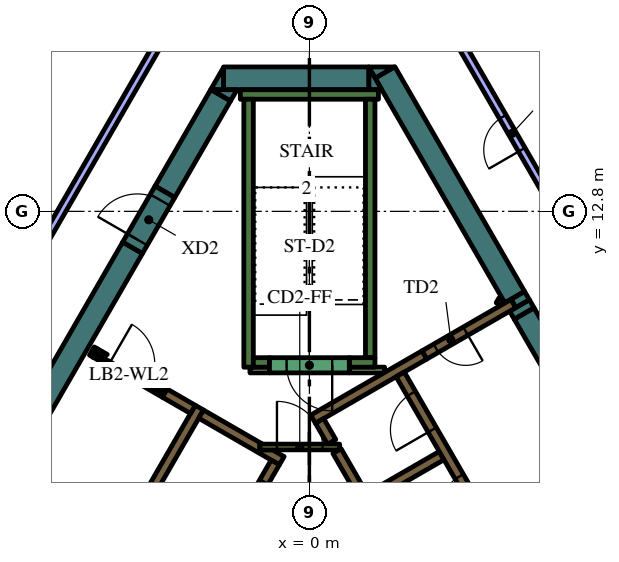
"""IFC4 building model, lengths in metres.
Left out: names, types, materials, properties, quantities, classifications, styles, units other than length and angle.
Written with IfcOpenShell. Run it as: python <this file> out.ifc"""

import sys

from ifc_helpers import new_model, si_unit, direction, frame, frame_2d, origin, place, context, subcontext, project, spatial, polyline, rectangle, outline, extrude, element, fill, save


model = new_model("IFC4")
c1 = context("Model", 3, precision=1e-05, world=origin(), true_north=direction((0.0, 1.0)))
c2 = subcontext(c1, "Body", "Model", "MODEL_VIEW")
j1 = project(units=[si_unit("LENGTHUNIT", "METRE"), si_unit("PLANEANGLEUNIT", "RADIAN")], contexts=[c1])
p1 = place(None, origin())
s1 = spatial("IfcSite", under=j1, at=p1, CompositionType="ELEMENT")
p2 = place(p1, origin())
s2 = spatial("IfcBuilding", under=s1, at=p2, CompositionType="ELEMENT")
p3 = place(p2, frame((0.0, 0.0, 296.4)))
s3 = spatial("IfcBuildingStorey", under=s2, at=p3, CompositionType="ELEMENT", Elevation=296.4)
p4 = place(p3, frame((5.529, 10.324, 0.0), z_axis=(0.0, 0.0, 1.0), x_axis=(0.499122205112, -0.866531606097, 0.0)))
e1 = element("IfcWall", 1, at=p4, inside=s3, PredefinedType="SOLIDWALL", context=c2, shape_type="SweptSolid", body=[
    extrude(rectangle(XDim=0.247, YDim=0.6, at=frame_2d((0.123, 0.0))), origin(), (0.0, 0.0, 1.0), 4.2),
])
p5 = place(p3, frame((1.989, 16.456, 0.0), z_axis=(0.0, 0.0, 1.0), x_axis=(0.499973159588, -0.866040899549, 0.0)))
e2 = element("IfcWall", 2, at=p5, inside=s3, PredefinedType="SOLIDWALL", context=c2, shape_type="SweptSolid", body=[
    extrude(rectangle(XDim=6.828, YDim=0.6, at=frame_2d((3.414, 0.0))), origin(), (0.0, 0.0, 1.0), 4.2),
])
p6 = place(p3, origin())
e3 = element("IfcWall", 3, at=p6, inside=s3, PredefinedType="SOLIDWALL", context=c2, shape_type="SweptSolid", body=[
    extrude(outline(polyline([(5.664, 10.691), (5.788, 10.476), (5.432, 10.271), (5.308, 10.486), (5.664, 10.691)])), origin(), (0.0, 0.0, 1.0), 4.2),
])
e4 = element("IfcWall", 4, at=p6, inside=s3, PredefinedType="SOLIDWALL", context=c2, shape_type="SweptSolid", body=[
    extrude(outline(polyline([(1.559, 16.6), (2.235, 16.6), (1.728, 16.307), (1.559, 16.6)])), origin(), (0.0, 0.0, 1.0), 4.2),
])
p7 = place(p3, frame((8.192, 5.711, 0.0), z_axis=(0.0, 0.0, 1.0), x_axis=(-0.500006836656, 0.866021456604, 0.0)))
e5 = element("IfcWall", 5, at=p7, inside=s3, PredefinedType="SOLIDWALL", context=c2, shape_type="SweptSolid", body=[
    extrude(rectangle(XDim=5.078, YDim=0.6, at=frame_2d((2.539, 0.0))), origin(), (0.0, 0.0, 1.0), 4.2),
])
p8 = place(p3, frame((-2.258, 16.3, 0.0), z_axis=(0.0, 0.0, 1.0), x_axis=(1.0, 0.0, 0.0)))
e6 = element("IfcWall", 6, at=p8, inside=s3, PredefinedType="SOLIDWALL", context=c2, shape_type="SweptSolid", body=[
    extrude(rectangle(XDim=3.823, YDim=0.6, at=frame_2d((1.912, 0.0))), origin(), (0.0, 0.0, 1.0), 4.2),
])
e7 = element("IfcWall", 7, at=p6, inside=s3, PredefinedType="SOLIDWALL", context=c2, shape_type="SweptSolid", body=[
    extrude(outline(polyline([(1.905, 16.0), (1.567, 16.0), (1.567, 16.585), (1.905, 16.0)])), origin(), (0.0, 0.0, 1.0), 4.2),
])
e8 = element("IfcWall", 8, at=p6, inside=s3, PredefinedType="SOLIDWALL", context=c2, shape_type="SweptSolid", body=[
    extrude(outline(polyline([(-2.598, 16.0), (-2.26, 16.585), (-2.26, 16.0), (-2.598, 16.0)])), origin(), (0.0, 0.0, 1.0), 4.2),
])
p9 = place(p3, frame((-2.335, 15.855, 0.0), z_axis=(0.0, 0.0, 1.0), x_axis=(-0.499960127962, -0.866048422692, 0.0)))
e9 = element("IfcWall", 9, at=p9, inside=s3, PredefinedType="SOLIDWALL", context=c2, shape_type="SweptSolid", body=[
    extrude(rectangle(XDim=2.934, YDim=0.6, at=frame_2d((1.467, 0.0))), origin(), (0.0, 0.0, 1.0), 4.2),
])
e10 = element("IfcWall", 10, at=p6, inside=s3, PredefinedType="SOLIDWALL", context=c2, shape_type="SweptSolid", body=[
    extrude(outline(polyline([(-1.905, 16.0), (-2.074, 15.707), (-2.581, 16.0), (-1.905, 16.0)])), origin(), (0.0, 0.0, 1.0), 4.2),
])
p10 = place(p3, frame((-12.582, -1.892, 0.0), z_axis=(0.0, 0.0, 1.0), x_axis=(0.500003640647, 0.866023301845, 0.0)))
e11 = element("IfcWall", 11, at=p10, inside=s3, PredefinedType="SOLIDWALL", context=c2, shape_type="SweptSolid", body=[
    extrude(rectangle(XDim=15.858, YDim=0.6, at=frame_2d((7.929, 0.0))), origin(), (0.0, 0.0, 1.0), 4.2),
])
p11 = place(p3, frame((-1.817, 15.875, 0.0), z_axis=(0.0, 0.0, 1.0), x_axis=(1.0, 0.0, 0.0)))
e12 = element("IfcWall", 12, at=p11, inside=s3, PredefinedType="SOLIDWALL", context=c2, shape_type="SweptSolid", body=[
    extrude(rectangle(XDim=3.634, YDim=0.25, at=frame_2d((1.817, 0.0))), origin(), (0.0, 0.0, 1.0), 4.2),
])
p12 = place(p3, frame((1.6, 8.95, 0.0), z_axis=(0.0, 0.0, 1.0), x_axis=(0.0, 1.0, 0.0)))
e13 = element("IfcWall", 13, at=p12, inside=s3, PredefinedType="SOLIDWALL", context=c2, shape_type="SweptSolid", body=[
    extrude(rectangle(XDim=6.8, YDim=0.25, at=frame_2d((3.4, 0.0))), origin(), (0.0, 0.0, 1.0), 4.2),
])
p13 = place(p3, frame((1.05, 8.825, 0.0), z_axis=(0.0, 0.0, 1.0), x_axis=(1.0, 0.0, 0.0)))
e14 = element("IfcWall", 14, at=p13, inside=s3, PredefinedType="SOLIDWALL", context=c2, shape_type="SweptSolid", body=[
    extrude(rectangle(XDim=0.675, YDim=0.25, at=frame_2d((0.337, 0.0))), origin(), (0.0, 0.0, 1.0), 4.2),
])
p14 = place(p3, frame((-1.6, 8.7, 0.0), z_axis=(0.0, 0.0, 1.0), x_axis=(0.0, 1.0, 0.0)))
e15 = element("IfcWall", 15, at=p14, inside=s3, PredefinedType="SOLIDWALL", context=c2, shape_type="SweptSolid", body=[
    extrude(rectangle(XDim=7.05, YDim=0.25, at=frame_2d((3.525, 0.0))), origin(), (0.0, 0.0, 1.0), 4.2),
])
p15 = place(p3, frame((-1.475, 8.825, 0.0), z_axis=(0.0, 0.0, 1.0), x_axis=(1.0, 0.0, 0.0)))
e16 = element("IfcWall", 16, at=p15, inside=s3, PredefinedType="SOLIDWALL", context=c2, shape_type="SweptSolid", body=[
    extrude(rectangle(XDim=0.425, YDim=0.25, at=frame_2d((0.212, 0.0))), origin(), (0.0, 0.0, 1.0), 4.2),
])
p16 = place(p3, frame((3.028, 9.023, 0.0), z_axis=(0.0, 0.0, 1.0), x_axis=(-0.866036587186, -0.49998062928, 0.0)))
e17 = element("IfcWall", 17, at=p16, inside=s3, PredefinedType="SOLIDWALL", context=c2, shape_type="SweptSolid", body=[
    extrude(rectangle(XDim=3.384, YDim=0.25, at=frame_2d((1.692, 0.0))), origin(), (0.0, 0.0, 1.0), 4.2),
])
p17 = place(p3, frame((0.268, 7.285, 0.0), z_axis=(0.0, 0.0, 1.0), x_axis=(0.500098681536, -0.865968422476, 0.0)))
e18 = element("IfcWall", 18, at=p17, inside=s3, PredefinedType="SOLIDWALL", context=c2, shape_type="SweptSolid", body=[
    extrude(rectangle(XDim=0.636, YDim=0.25, at=frame_2d((0.318, 0.0))), origin(), (0.0, 0.0, 1.0), 4.2),
])
p18 = place(p3, frame((5.97, -2.591, 0.0), z_axis=(0.0, 0.0, 1.0), x_axis=(-0.499994469932, 0.866028596547, 0.0)))
e19 = element("IfcWall", 19, at=p18, inside=s3, PredefinedType="SOLIDWALL", context=c2, shape_type="SweptSolid", body=[
    extrude(rectangle(XDim=10.488, YDim=0.25, at=frame_2d((5.244, 0.0))), origin(), (0.0, 0.0, 1.0), 4.2),
])
p19 = place(p3, frame((1.574, 5.274, 0.0), z_axis=(0.0, 0.0, 1.0), x_axis=(0.866028486751, 0.499994660107, 0.0)))
e20 = element("IfcWall", 20, at=p19, inside=s3, PredefinedType="SOLIDWALL", context=c2, shape_type="SweptSolid", body=[
    extrude(rectangle(XDim=2.2, YDim=0.25, at=frame_2d((1.1, 0.0))), origin(), (0.0, 0.0, 1.0), 4.2),
])
p20 = place(p3, frame((-8.06, -1.311, 0.0), z_axis=(0.0, 0.0, 1.0), x_axis=(0.50000273126, 0.866023826885, 0.0)))
e21 = element("IfcWall", 21, at=p20, inside=s3, PredefinedType="SOLIDWALL", context=c2, shape_type="SweptSolid", body=[
    extrude(rectangle(XDim=10.33, YDim=0.25, at=frame_2d((5.165, 0.0))), origin(), (0.0, 0.0, 1.0), 4.2),
])
e22 = element("IfcWall", 22, at=p6, inside=s3, PredefinedType="SOLIDWALL", context=c2, shape_type="SweptSolid", body=[
    extrude(outline(polyline([(-2.912, 7.356), (-2.787, 7.573), (-1.232, 6.675), (-1.303, 6.675), (-1.304, 6.675), (-1.304, 6.675), (-1.304, 6.525), (-1.304, 6.525), (-1.303, 6.525), (-0.971, 6.525), (-0.665, 6.348), (-0.79, 6.132), (-1.007, 6.257), (-1.007, 6.257), (-2.912, 7.356)])), origin(), (0.0, 0.0, 1.0), 4.2),
])
p21 = place(p3, frame((-5.725, 9.125, 0.0), z_axis=(0.0, 0.0, 1.0), x_axis=(0.866185586049, -0.49972245349, 0.0)))
e23 = element("IfcWall", 23, at=p21, inside=s3, PredefinedType="SOLIDWALL", context=c2, shape_type="SweptSolid", body=[
    extrude(rectangle(XDim=0.11, YDim=0.25, at=frame_2d((0.055, 0.0))), origin(), (0.0, 0.0, 1.0), 4.2),
])
p22 = place(p3, frame((-3.066, 7.59, 0.0), z_axis=(0.0, 0.0, 1.0), x_axis=(-0.866081358704, 0.49990307071, 0.0)))
e24 = element("IfcWall", 24, at=p22, inside=s3, PredefinedType="SOLIDWALL", context=c2, shape_type="SweptSolid", body=[
    extrude(rectangle(XDim=0.858, YDim=0.25, at=frame_2d((0.429, 0.0))), origin(), (0.0, 0.0, 1.0), 4.2),
])
e25 = element("IfcWall", 25, at=p6, inside=s3, PredefinedType="SOLIDWALL", context=c2, shape_type="SweptSolid", body=[
    extrude(outline(polyline([(-3.748, 8.128), (-3.813, 8.015), (-4.027, 8.139), (-4.017, 8.156), (-4.008, 8.173), (-4.0, 8.192), (-3.995, 8.21), (-3.991, 8.23), (-3.99, 8.25), (-3.99, 8.268), (-3.748, 8.128)])), origin(), (0.0, 0.0, 1.0), 4.2),
])
e26 = element("IfcWall", 26, at=p6, inside=s3, PredefinedType="SOLIDWALL", context=c2, shape_type="SweptSolid", body=[
    extrude(outline(polyline([(-5.689, 8.96), (-5.69, 8.961), (-5.565, 9.177), (-5.319, 9.035), (-5.335, 9.026), (-5.351, 9.015), (-5.366, 9.002), (-5.379, 8.988), (-5.392, 8.972), (-5.402, 8.956), (-5.412, 8.939), (-5.629, 9.064), (-5.629, 9.064), (-5.689, 8.96)])), origin(), (0.0, 0.0, 1.0), 4.2),
])
p23 = place(p3, frame((1.05, 8.625, 0.0), z_axis=(0.0, 0.0, 1.0), x_axis=(1.0, 0.0, 0.0)))
e27 = element("IfcWall", 27, at=p23, inside=s3, PredefinedType="PARTITIONING", context=c2, shape_type="SweptSolid", body=[
    extrude(rectangle(XDim=0.929, YDim=0.15, at=frame_2d((0.464, 0.0))), origin(), (0.0, 0.0, 1.0), 3.55),
])
p24 = place(p3, frame((-1.564, 8.625, 0.0), z_axis=(0.0, 0.0, 1.0), x_axis=(1.0, 0.0, 0.0)))
e28 = element("IfcWall", 28, at=p24, inside=s3, PredefinedType="PARTITIONING", context=c2, shape_type="SweptSolid", body=[
    extrude(rectangle(XDim=0.514, YDim=0.15, at=frame_2d((0.257, 0.0))), origin(), (0.0, 0.0, 1.0), 3.55),
])
p25 = place(p3, frame((4.98, 10.358, 0.0), z_axis=(0.0, 0.0, 1.0), x_axis=(0.500640202437, 0.86565546709, 0.0)))
e29 = element("IfcWall", 29, at=p25, inside=s3, PredefinedType="PARTITIONING", context=c2, shape_type="SweptSolid", body=[
    extrude(rectangle(XDim=0.146, YDim=0.15, at=frame_2d((0.073, 0.0))), origin(), (0.0, 0.0, 1.0), 3.55),
])
p26 = place(p3, frame((8.565, -2.185, 0.0), z_axis=(0.0, 0.0, 1.0), x_axis=(-0.499997954832, 0.866026584559, 0.0)))
e30 = element("IfcWall", 30, at=p26, inside=s3, PredefinedType="SOLIDWALL", context=c2, shape_type="SweptSolid", body=[
    extrude(rectangle(XDim=12.35, YDim=0.25, at=frame_2d((6.175, 0.0))), origin(), (0.0, 0.0, 1.0), 4.2),
])
p27 = place(p26, frame((0.685, 0.0, 0.0)))
e31 = element("IfcOpeningElement", 31, at=p27, cuts=e30, PredefinedType="OPENING", context=c2, shape_type="SweptSolid", body=[
    extrude(rectangle(XDim=0.9, YDim=2.1, at=frame_2d((0.45, 1.05))), frame((0.0, 0.135, 0.0), z_axis=(0.0, -1.0, 0.0), x_axis=(1.0, 0.0, 0.0)), (0.0, 0.0, 1.0), 0.27),
])
p28 = place(p26, frame((3.105, 0.0, 0.0)))
e32 = element("IfcOpeningElement", 32, at=p28, cuts=e30, PredefinedType="OPENING", context=c2, shape_type="SweptSolid", body=[
    extrude(rectangle(XDim=1.1, YDim=2.1, at=frame_2d((0.55, 1.05))), frame((0.0, 0.135, 0.0), z_axis=(0.0, -1.0, 0.0), x_axis=(1.0, 0.0, 0.0)), (0.0, 0.0, 1.0), 0.27),
])
p29 = place(p26, frame((5.625, 0.0, 0.0)))
e33 = element("IfcOpeningElement", 33, at=p29, cuts=e30, PredefinedType="OPENING", context=c2, shape_type="SweptSolid", body=[
    extrude(rectangle(XDim=1.1, YDim=2.1, at=frame_2d((0.55, 1.05))), frame((0.0, 0.135, 0.0), z_axis=(0.0, -1.0, 0.0), x_axis=(1.0, 0.0, 0.0)), (0.0, 0.0, 1.0), 0.27),
])
p30 = place(p26, frame((8.145, 0.0, 0.0)))
e34 = element("IfcOpeningElement", 34, at=p30, cuts=e30, PredefinedType="OPENING", context=c2, shape_type="SweptSolid", body=[
    extrude(rectangle(XDim=1.1, YDim=2.1, at=frame_2d((0.55, 1.05))), frame((0.0, 0.135, 0.0), z_axis=(0.0, -1.0, 0.0), x_axis=(1.0, 0.0, 0.0)), (0.0, 0.0, 1.0), 0.27),
])
p31 = place(p26, frame((10.665, 0.0, 0.0)))
e35 = element("IfcOpeningElement", 35, at=p31, cuts=e30, PredefinedType="OPENING", context=c2, shape_type="SweptSolid", body=[
    extrude(rectangle(XDim=1.1, YDim=2.1, at=frame_2d((0.55, 1.05))), frame((0.0, 0.135, 0.0), z_axis=(0.0, -1.0, 0.0), x_axis=(1.0, 0.0, 0.0)), (0.0, 0.0, 1.0), 0.27),
])
p32 = place(p3, frame((-0.898, 6.194, 0.0), z_axis=(0.0, 0.0, 1.0), x_axis=(-0.499996202215, -0.866027596426, 0.0)))
e36 = element("IfcWall", 36, at=p32, inside=s3, PredefinedType="SOLIDWALL", context=c2, shape_type="SweptSolid", body=[
    extrude(rectangle(XDim=9.83, YDim=0.25, at=frame_2d((4.915, 0.0))), origin(), (0.0, 0.0, 1.0), 4.2),
])
p33 = place(p32, frame((0.585, 0.0, 0.0)))
e37 = element("IfcOpeningElement", 37, at=p33, cuts=e36, PredefinedType="OPENING", context=c2, shape_type="SweptSolid", body=[
    extrude(rectangle(XDim=1.1, YDim=2.1, at=frame_2d((0.55, 1.05))), frame((0.0, 0.135, 0.0), z_axis=(0.0, -1.0, 0.0), x_axis=(1.0, 0.0, 0.0)), (0.0, 0.0, 1.0), 0.27),
])
p34 = place(p32, frame((3.105, 0.0, 0.0)))
e38 = element("IfcOpeningElement", 38, at=p34, cuts=e36, PredefinedType="OPENING", context=c2, shape_type="SweptSolid", body=[
    extrude(rectangle(XDim=1.1, YDim=2.1, at=frame_2d((0.55, 1.05))), frame((0.0, 0.135, 0.0), z_axis=(0.0, -1.0, 0.0), x_axis=(1.0, 0.0, 0.0)), (0.0, 0.0, 1.0), 0.27),
])
p35 = place(p32, frame((5.625, 0.0, 0.0)))
e39 = element("IfcOpeningElement", 39, at=p35, cuts=e36, PredefinedType="OPENING", context=c2, shape_type="SweptSolid", body=[
    extrude(rectangle(XDim=1.1, YDim=2.1, at=frame_2d((0.55, 1.05))), frame((0.0, 0.135, 0.0), z_axis=(0.0, -1.0, 0.0), x_axis=(1.0, 0.0, 0.0)), (0.0, 0.0, 1.0), 0.27),
])
p36 = place(p32, frame((8.145, 0.0, 0.0)))
e40 = element("IfcOpeningElement", 40, at=p36, cuts=e36, PredefinedType="OPENING", context=c2, shape_type="SweptSolid", body=[
    extrude(rectangle(XDim=1.1, YDim=2.1, at=frame_2d((0.55, 1.05))), frame((0.0, 0.135, 0.0), z_axis=(0.0, -1.0, 0.0), x_axis=(1.0, 0.0, 0.0)), (0.0, 0.0, 1.0), 0.27),
])
p37 = place(p3, frame((1.05, 8.75, 0.0), z_axis=(0.0, 0.0, 1.0), x_axis=(-1.0, 0.0, 0.0)))
e41 = element("IfcWall", 41, at=p37, inside=s3, PredefinedType="SOLIDWALL", context=c2, shape_type="SweptSolid", body=[
    extrude(rectangle(XDim=2.1, YDim=0.4, at=frame_2d((1.05, 0.0))), origin(), (0.0, 0.0, 1.0), 4.2),
])
p38 = place(p37, frame((0.45, 0.0, 0.0)))
e42 = element("IfcOpeningElement", 42, at=p38, cuts=e41, PredefinedType="OPENING", context=c2, shape_type="SweptSolid", body=[
    extrude(rectangle(XDim=1.2, YDim=2.1, at=frame_2d((0.6, 1.05))), frame((0.0, 0.21, 0.0), z_axis=(0.0, -1.0, 0.0), x_axis=(1.0, 0.0, 0.0)), (0.0, 0.0, 1.0), 0.42),
])
p39 = place(p3, frame((5.366, 10.373, 0.0), z_axis=(0.0, 0.0, 1.0), x_axis=(-0.866019956843, -0.50000943426, 0.0)))
e43 = element("IfcWall", 43, at=p39, inside=s3, PredefinedType="SOLIDWALL", context=c2, shape_type="SweptSolid", body=[
    extrude(rectangle(XDim=2.7, YDim=0.25, at=frame_2d((1.35, 0.0))), origin(), (0.0, 0.0, 1.0), 4.2),
])
p40 = place(p39, frame((1.45, 0.0, 0.0)))
e44 = element("IfcOpeningElement", 44, at=p40, cuts=e43, PredefinedType="OPENING", context=c2, shape_type="SweptSolid", body=[
    extrude(rectangle(XDim=0.9, YDim=2.1, at=frame_2d((0.45, 1.05))), frame((0.0, 0.135, 0.0), z_axis=(0.0, -1.0, 0.0), x_axis=(1.0, 0.0, 0.0)), (0.0, 0.0, 1.0), 0.27),
])
p41 = place(p3, frame((-1.303, 6.6, 0.0), z_axis=(0.0, 0.0, 1.0), x_axis=(1.0, 0.0, 0.0)))
e45 = element("IfcWall", 45, at=p41, inside=s3, PredefinedType="PARTITIONING", context=c2, shape_type="SweptSolid", body=[
    extrude(rectangle(XDim=2.1, YDim=0.15, at=frame_2d((1.05, 0.0))), origin(), (0.0, 0.0, 1.0), 4.2),
])
p42 = place(p41, frame((0.45, 0.0, 0.0)))
e46 = element("IfcOpeningElement", 46, at=p42, cuts=e45, PredefinedType="OPENING", context=c2, shape_type="SweptSolid", body=[
    extrude(rectangle(XDim=1.2, YDim=2.1, at=frame_2d((0.6, 1.05))), frame((0.0, 0.085, 0.0), z_axis=(0.0, -1.0, 0.0), x_axis=(1.0, 0.0, 0.0)), (0.0, 0.0, 1.0), 0.17),
])
p43 = place(p3, frame((-5.659, 9.012, 0.0), z_axis=(0.0, 0.0, 1.0), x_axis=(0.866009402589, -0.500027713859, 0.0)))
e47 = element("IfcWall", 47, at=p43, inside=s3, PredefinedType="PARTITIONING", context=c2, shape_type="SweptSolid", body=[
    extrude(rectangle(XDim=2.1, YDim=0.12, at=frame_2d((1.05, 0.0))), origin(), (0.0, 0.0, 1.0), 3.55),
])
p44 = place(p43, frame((0.45, 0.0, 0.0)))
e48 = element("IfcOpeningElement", 48, at=p44, cuts=e47, PredefinedType="OPENING", context=c2, shape_type="SweptSolid", body=[
    extrude(rectangle(XDim=1.2, YDim=2.1, at=frame_2d((0.6, 1.05))), frame((0.0, 0.07, 0.0), z_axis=(0.0, -1.0, 0.0), x_axis=(1.0, 0.0, 0.0)), (0.0, 0.0, 1.0), 0.14),
])
p45 = place(p3, frame((-4.652, 11.842, 0.0), z_axis=(0.0, 0.0, 1.0), x_axis=(0.500062241894, 0.865989465428, 0.0)))
e49 = element("IfcWall", 49, at=p45, inside=s3, PredefinedType="SOLIDWALL", context=c2, shape_type="SweptSolid", body=[
    extrude(rectangle(XDim=1.7, YDim=0.6, at=frame_2d((0.85, 0.0))), origin(), (0.0, 0.0, 1.0), 4.2),
])
p46 = place(p45, frame((0.25, 0.0, 0.0)))
e50 = element("IfcOpeningElement", 50, at=p46, cuts=e49, PredefinedType="OPENING", context=c2, shape_type="SweptSolid", body=[
    extrude(rectangle(XDim=1.2, YDim=2.1, at=frame_2d((0.6, 1.05))), frame((0.0, 0.31, 0.0), z_axis=(0.0, -1.0, 0.0), x_axis=(1.0, 0.0, 0.0)), (0.0, 0.0, 1.0), 0.62),
])
p47 = place(p3, frame((7.188, 11.65, 0.0), z_axis=(0.0, 0.0, 1.0), x_axis=(-0.499989634868, 0.866031388014, 0.0)))
e51 = element("IfcWall", 51, at=p47, inside=s3, PredefinedType="PARTITIONING", context=c2, shape_type="SweptSolid", body=[
    extrude(rectangle(XDim=7.303, YDim=0.2, at=frame_2d((3.652, 0.0))), origin(), (0.0, 0.0, 1.0), 3.55),
])
p48 = place(p47, frame((3.2, 0.0, 0.0)))
e52 = element("IfcOpeningElement", 52, at=p48, cuts=e51, PredefinedType="OPENING", context=c2, shape_type="SweptSolid", body=[
    extrude(rectangle(XDim=1.0, YDim=2.1, at=frame_2d((0.5, 1.05))), frame((0.0, 0.11, 0.0), z_axis=(0.0, -1.0, 0.0), x_axis=(1.0, 0.0, 0.0)), (0.0, 0.0, 1.0), 0.22),
])
p49 = place(p3, frame((-7.962, 15.8, 0.0), z_axis=(0.0, 0.0, 1.0), x_axis=(0.599541489613, 0.800343677574, 0.0)))
e53 = element("IfcWall", 53, at=p49, inside=s3, PredefinedType="PARTITIONING", context=c2, shape_type="SweptSolid", body=[
    extrude(rectangle(XDim=4.942, YDim=0.15, at=frame_2d((2.471, 0.0))), origin(), (0.0, 0.0, 1.0), 3.55),
])
p50 = place(p49, frame((2.042, 0.0, 0.0)))
e54 = element("IfcOpeningElement", 54, at=p50, cuts=e53, PredefinedType="OPENING", context=c2, shape_type="SweptSolid", body=[
    extrude(rectangle(XDim=0.9, YDim=2.1, at=frame_2d((0.45, 1.05))), frame((0.0, 0.085, 0.0), z_axis=(0.0, -1.0, 0.0), x_axis=(1.0, 0.0, 0.0)), (0.0, 0.0, 1.0), 0.17),
])
p51 = place(p3, frame((-3.306, 18.374, 0.0), z_axis=(0.0, 0.0, 1.0), x_axis=(-0.499999798456, -0.866025520146, 0.0)))
e55 = element("IfcWall", 55, at=p51, inside=s3, PredefinedType="PARTITIONING", context=c2, shape_type="SweptSolid", body=[
    extrude(rectangle(XDim=8.229, YDim=0.2, at=frame_2d((4.115, 0.0))), origin(), (0.0, 0.0, 1.0), 3.55),
])
p52 = place(p30, origin())
e56 = element("IfcDoor", 56, at=p52, inside=s3, OperationType="DOUBLE_DOOR_SLIDING", PredefinedType="DOOR", context=c2, shape_type="SweptSolid", body=[
    extrude(rectangle(XDim=1.1, YDim=2.1, at=frame_2d((0.55, 1.05))), frame((0.0, 0.025, 0.0), z_axis=(0.0, -1.0, 0.0), x_axis=(1.0, 0.0, 0.0)), (0.0, 0.0, 1.0), 0.05),
])
fill(e34, e56)
p53 = place(p31, origin())
e57 = element("IfcDoor", 57, at=p53, inside=s3, OperationType="DOUBLE_DOOR_SLIDING", PredefinedType="DOOR", context=c2, shape_type="SweptSolid", body=[
    extrude(rectangle(XDim=1.1, YDim=2.1, at=frame_2d((0.55, 1.05))), frame((0.0, 0.025, 0.0), z_axis=(0.0, -1.0, 0.0), x_axis=(1.0, 0.0, 0.0)), (0.0, 0.0, 1.0), 0.05),
])
fill(e35, e57)
p54 = place(p33, origin())
e58 = element("IfcDoor", 58, at=p54, inside=s3, OperationType="DOUBLE_DOOR_SLIDING", PredefinedType="DOOR", context=c2, shape_type="SweptSolid", body=[
    extrude(rectangle(XDim=1.1, YDim=2.1, at=frame_2d((0.55, 1.05))), frame((0.0, 0.025, 0.0), z_axis=(0.0, -1.0, 0.0), x_axis=(1.0, 0.0, 0.0)), (0.0, 0.0, 1.0), 0.05),
])
fill(e37, e58)
p55 = place(p38, origin())
e59 = element("IfcDoor", 59, at=p55, inside=s3, OperationType="SINGLE_SWING_LEFT", PredefinedType="DOOR", context=c2, shape_type="SweptSolid", body=[
    extrude(rectangle(XDim=1.2, YDim=2.1, at=frame_2d((0.6, 1.05))), frame((0.0, 0.025, 0.0), z_axis=(0.0, -1.0, 0.0), x_axis=(1.0, 0.0, 0.0)), (0.0, 0.0, 1.0), 0.05),
])
fill(e42, e59)
p56 = place(p40, origin())
e60 = element("IfcDoor", 60, at=p56, inside=s3, OperationType="SINGLE_SWING_LEFT", PredefinedType="DOOR", context=c2, shape_type="SweptSolid", body=[
    extrude(rectangle(XDim=0.9, YDim=2.1, at=frame_2d((0.45, 1.05))), frame((0.0, 0.025, 0.0), z_axis=(0.0, -1.0, 0.0), x_axis=(1.0, 0.0, 0.0)), (0.0, 0.0, 1.0), 0.05),
])
fill(e44, e60)
p57 = place(p42, origin())
e61 = element("IfcDoor", 61, at=p57, inside=s3, OperationType="SINGLE_SWING_LEFT", PredefinedType="DOOR", context=c2, shape_type="SweptSolid", body=[
    extrude(rectangle(XDim=1.2, YDim=2.1, at=frame_2d((0.6, 1.05))), frame((0.0, 0.025, 0.0), z_axis=(0.0, -1.0, 0.0), x_axis=(1.0, 0.0, 0.0)), (0.0, 0.0, 1.0), 0.05),
])
fill(e46, e61)
p58 = place(p44, origin())
e62 = element("IfcDoor", 62, at=p58, inside=s3, OperationType="SINGLE_SWING_LEFT", PredefinedType="DOOR", context=c2, shape_type="SweptSolid", body=[
    extrude(rectangle(XDim=1.2, YDim=2.1, at=frame_2d((0.6, 1.05))), frame((0.0, 0.025, 0.0), z_axis=(0.0, -1.0, 0.0), x_axis=(1.0, 0.0, 0.0)), (0.0, 0.0, 1.0), 0.05),
])
fill(e48, e62)
p59 = place(p46, origin())
e63 = element("IfcDoor", 63, at=p59, inside=s3, OperationType="SINGLE_SWING_LEFT", PredefinedType="DOOR", context=c2, shape_type="SweptSolid", body=[
    extrude(rectangle(XDim=1.2, YDim=2.1, at=frame_2d((0.6, 1.05))), frame((0.0, 0.025, 0.0), z_axis=(0.0, -1.0, 0.0), x_axis=(1.0, 0.0, 0.0)), (0.0, 0.0, 1.0), 0.05),
])
fill(e50, e63)
p60 = place(p48, origin())
e64 = element("IfcDoor", 64, at=p60, inside=s3, OperationType="SINGLE_SWING_RIGHT", PredefinedType="DOOR", context=c2, shape_type="SweptSolid", body=[
    extrude(rectangle(XDim=1.0, YDim=2.1, at=frame_2d((0.5, 1.05))), frame((0.0, 0.025, 0.0), z_axis=(0.0, -1.0, 0.0), x_axis=(1.0, 0.0, 0.0)), (0.0, 0.0, 1.0), 0.05),
])
fill(e52, e64)
save(model, sys.argv[1])
